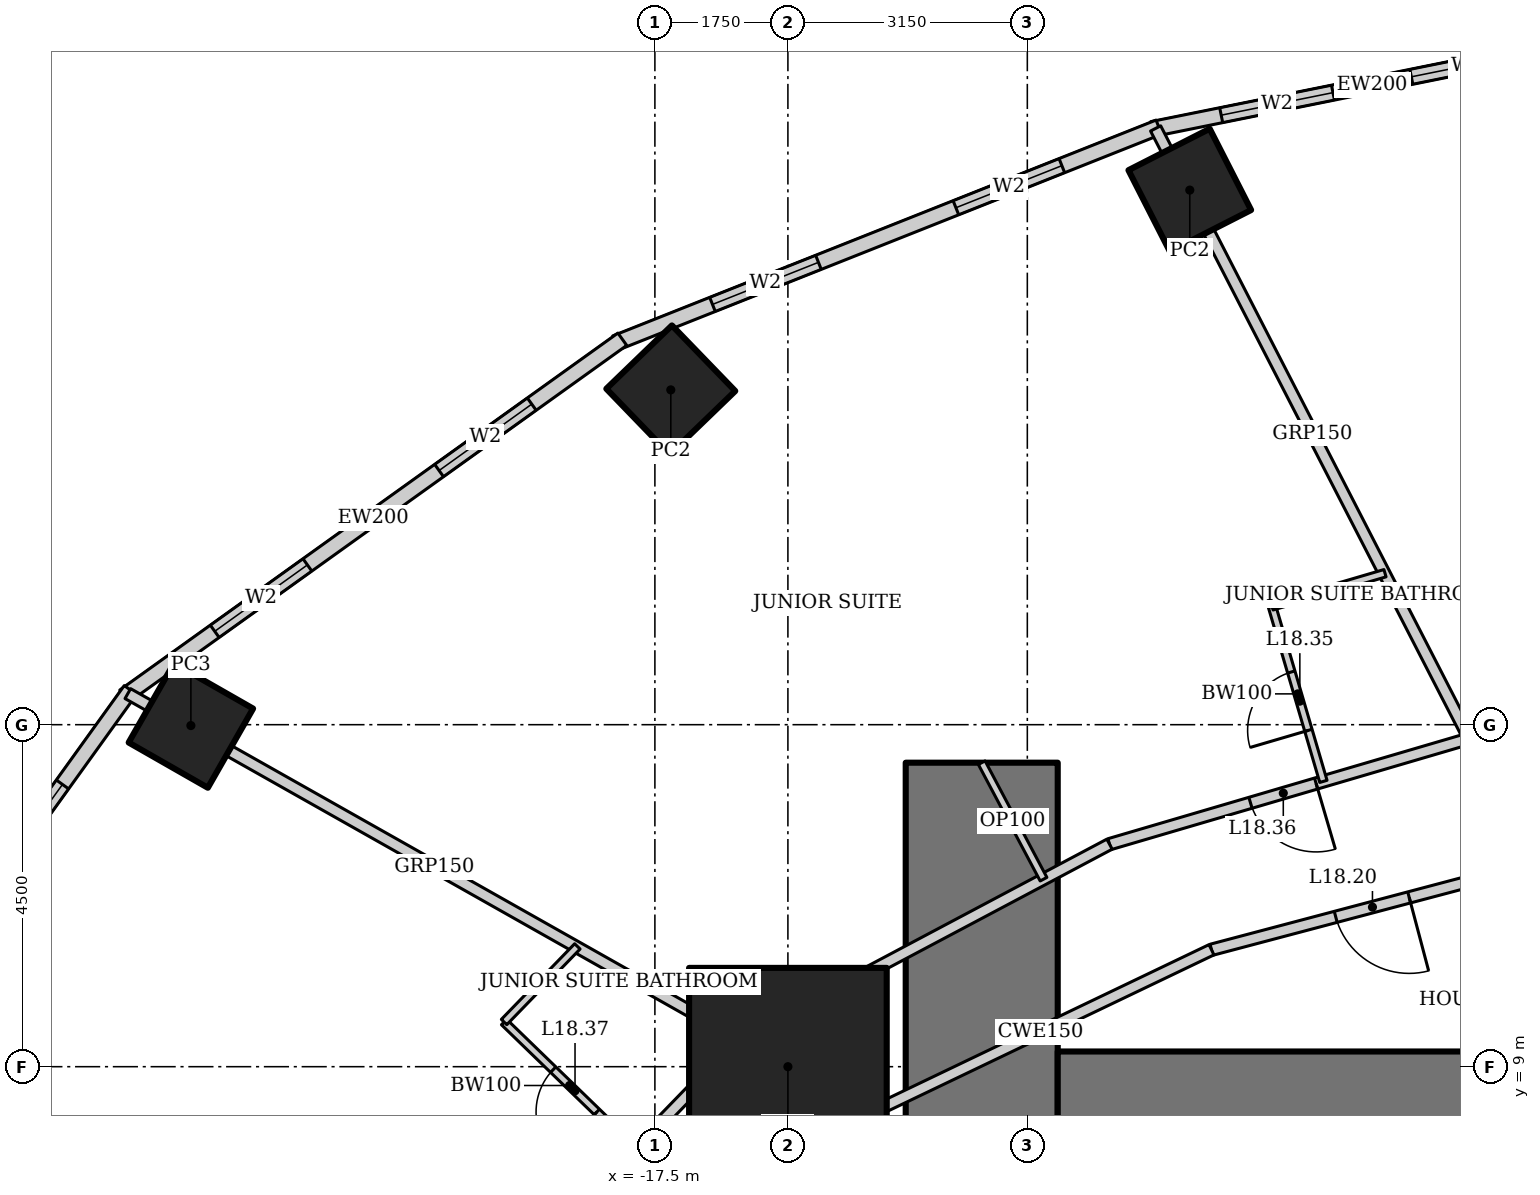
"""IFC4 building model, lengths in metres.
Left out: names, types, materials, properties, quantities, classifications, styles, units other than length and angle.
Written with IfcOpenShell. Run it as: python <this file> out.ifc"""

import sys

from ifc_helpers import new_model, si_unit, direction, frame, frame_2d, origin, origin_2d, place, context, subcontext, project, spatial, rectangle, hollow_rectangle, extrude, element, fill, save


model = new_model("IFC4")
c1 = context("Model", 3, precision=1e-05, world=origin(), true_north=direction((0.0, 1.0)))
c2 = subcontext(c1, "Body", "Model", "MODEL_VIEW")
j1 = project(units=[si_unit("LENGTHUNIT", "METRE"), si_unit("PLANEANGLEUNIT", "RADIAN")], contexts=[c1])
p1 = place(None, origin())
s1 = spatial("IfcSite", under=j1, at=p1, CompositionType="ELEMENT")
p2 = place(p1, origin())
s2 = spatial("IfcBuilding", under=s1, at=p2, CompositionType="ELEMENT")
p3 = place(p2, frame((0.0, 0.0, 80.2)))
s3 = spatial("IfcBuildingStorey", under=s2, at=p3, CompositionType="ELEMENT", Elevation=80.2)
p4 = place(p3, frame((-15.75, 9.0, 0.0), z_axis=(0.0, 0.0, 1.0), x_axis=(1.0, 0.0, 0.0)))
e1 = element("IfcColumn", 1, at=p4, inside=s3, PredefinedType="COLUMN", context=c2, shape_type="SweptSolid", body=[
    extrude(hollow_rectangle(XDim=2.6, YDim=2.6, WallThickness=0.13, at=origin_2d()), origin(), (0.0, 0.0, 1.0), 3.6),
])
for number, where, z_axis, x_axis in (
    (2, (-10.463, 20.534, 0.0), (0.0, 0.0, 1.0), (0.891, 0.454, 0.0)),
    (3, (-17.291, 17.905, 0.0), (0.0, 0.0, 1.0), (0.719, 0.695, 0.0)),
):
    element("IfcColumn", number, at=place(p3, frame(where, z_axis=z_axis, x_axis=x_axis)), inside=s3, PredefinedType="COLUMN", context=c2, shape_type="SweptSolid", body=[
        extrude(hollow_rectangle(XDim=1.2, YDim=1.2, WallThickness=0.1, at=origin_2d()), origin(), (0.0, 0.0, 1.0), 3.6),
    ])
p5 = place(p3, frame((-23.605, 13.489, 0.0), z_axis=(0.0, 0.0, 1.0), x_axis=(0.496139221777, 0.86824298017, 0.0)))
e4 = element("IfcColumn", 4, at=p5, inside=s3, PredefinedType="COLUMN", context=c2, shape_type="SweptSolid", body=[
    extrude(hollow_rectangle(XDim=1.2, YDim=1.2, WallThickness=0.12, at=origin_2d()), origin(), (0.0, 0.0, 1.0), 3.6),
])
p6 = place(p3, frame((-13.2, 13.0, 0.0), z_axis=(0.0, 0.0, 1.0), x_axis=(0.0, -1.0, 0.0)))
e5 = element("IfcWall", 5, at=p6, inside=s3, PredefinedType="SHEAR", context=c2, shape_type="SweptSolid", body=[
    extrude(rectangle(XDim=26.0, YDim=2.0, at=frame_2d((13.0, 0.0))), origin(), (0.0, 0.0, 1.0), 3.6),
])
p7 = place(p6, frame((12.1, 0.0, 0.0)))
e6 = element("IfcOpeningElement", 6, at=p7, cuts=e5, PredefinedType="OPENING", context=c2, shape_type="SweptSolid", body=[
    extrude(rectangle(XDim=1.8, YDim=2.1, at=frame_2d((0.9, 1.05))), frame((0.0, 1.01, 0.0), z_axis=(0.0, -1.0, 0.0), x_axis=(1.0, 0.0, 0.0)), (0.0, 0.0, 1.0), 2.02),
])
p8 = place(p3, frame((12.2, 8.0, 0.0), z_axis=(0.0, 0.0, 1.0), x_axis=(-1.0, 0.0, 0.0)))
e7 = element("IfcWall", 7, at=p8, inside=s3, PredefinedType="SHEAR", context=c2, shape_type="SweptSolid", body=[
    extrude(rectangle(XDim=24.4, YDim=2.4, at=frame_2d((12.2, 0.0))), origin(), (0.0, 0.0, 1.0), 3.6),
])
p9 = place(p3, frame((-5.17, 22.504, 0.0), z_axis=(0.0, 0.0, 1.0), x_axis=(-0.980251657452, -0.197754110105, 0.0)))
e8 = element("IfcWall", 8, at=p9, inside=s3, PredefinedType="SOLIDWALL", context=c2, shape_type="SweptSolid", body=[
    extrude(rectangle(XDim=5.904, YDim=0.2, at=frame_2d((2.952, 0.0))), origin(), (0.0, 0.0, 1.0), 3.45),
])
p10 = place(p9, frame((0.926, 0.0, 0.5)))
e9 = element("IfcOpeningElement", 9, at=p10, cuts=e8, PredefinedType="OPENING", context=c2, shape_type="SweptSolid", body=[
    extrude(rectangle(XDim=1.5, YDim=2.2, at=frame_2d((0.75, 1.1))), frame((0.0, 0.11, 0.0), z_axis=(0.0, -1.0, 0.0), x_axis=(1.0, 0.0, 0.0)), (0.0, 0.0, 1.0), 0.22),
])
p11 = place(p9, frame((3.478, 0.0, 0.5)))
e10 = element("IfcOpeningElement", 10, at=p11, cuts=e8, PredefinedType="OPENING", context=c2, shape_type="SweptSolid", body=[
    extrude(rectangle(XDim=1.5, YDim=2.2, at=frame_2d((0.75, 1.1))), frame((0.0, 0.11, 0.0), z_axis=(0.0, -1.0, 0.0), x_axis=(1.0, 0.0, 0.0)), (0.0, 0.0, 1.0), 0.22),
])
p12 = place(p3, frame((-10.869, 21.363, 0.0), z_axis=(0.0, 0.0, 1.0), x_axis=(-0.929358351251, -0.369178892895, 0.0)))
e11 = element("IfcWall", 11, at=p12, inside=s3, PredefinedType="SOLIDWALL", context=c2, shape_type="SweptSolid", body=[
    extrude(rectangle(XDim=7.692, YDim=0.2, at=frame_2d((3.846, 0.0))), origin(), (0.0, 0.0, 1.0), 3.45),
])
p13 = place(p12, frame((1.373, 0.0, 0.5)))
e12 = element("IfcOpeningElement", 12, at=p13, cuts=e11, PredefinedType="OPENING", context=c2, shape_type="SweptSolid", body=[
    extrude(rectangle(XDim=1.5, YDim=2.2, at=frame_2d((0.75, 1.1))), frame((0.0, 0.11, 0.0), z_axis=(0.0, -1.0, 0.0), x_axis=(1.0, 0.0, 0.0)), (0.0, 0.0, 1.0), 0.22),
])
p14 = place(p12, frame((4.819, 0.0, 0.5)))
e13 = element("IfcOpeningElement", 13, at=p14, cuts=e11, PredefinedType="OPENING", context=c2, shape_type="SweptSolid", body=[
    extrude(rectangle(XDim=1.5, YDim=2.2, at=frame_2d((0.75, 1.1))), frame((0.0, 0.11, 0.0), z_axis=(0.0, -1.0, 0.0), x_axis=(1.0, 0.0, 0.0)), (0.0, 0.0, 1.0), 0.22),
])
p15 = place(p3, frame((-17.929, 18.572, 0.0), z_axis=(0.0, 0.0, 1.0), x_axis=(-0.812791321576, -0.582554948112, 0.0)))
e14 = element("IfcWall", 14, at=p15, inside=s3, PredefinedType="SOLIDWALL", context=c2, shape_type="SweptSolid", body=[
    extrude(rectangle(XDim=8.063, YDim=0.2, at=frame_2d((4.032, 0.0))), origin(), (0.0, 0.0, 1.0), 3.45),
])
p16 = place(p15, frame((1.466, 0.0, 0.5)))
e15 = element("IfcOpeningElement", 15, at=p16, cuts=e14, PredefinedType="OPENING", context=c2, shape_type="SweptSolid", body=[
    extrude(rectangle(XDim=1.5, YDim=2.2, at=frame_2d((0.75, 1.1))), frame((0.0, 0.11, 0.0), z_axis=(0.0, -1.0, 0.0), x_axis=(1.0, 0.0, 0.0)), (0.0, 0.0, 1.0), 0.22),
])
p17 = place(p15, frame((5.097, 0.0, 0.5)))
e16 = element("IfcOpeningElement", 16, at=p17, cuts=e14, PredefinedType="OPENING", context=c2, shape_type="SweptSolid", body=[
    extrude(rectangle(XDim=1.5, YDim=2.2, at=frame_2d((0.75, 1.1))), frame((0.0, 0.11, 0.0), z_axis=(0.0, -1.0, 0.0), x_axis=(1.0, 0.0, 0.0)), (0.0, 0.0, 1.0), 0.22),
])
p18 = place(p3, frame((-24.4, 13.957, 0.0), z_axis=(0.0, 0.0, 1.0), x_axis=(-0.583937613703, -0.811798536155, 0.0)))
e17 = element("IfcWall", 17, at=p18, inside=s3, PredefinedType="SOLIDWALL", context=c2, shape_type="SweptSolid", body=[
    extrude(rectangle(XDim=8.323, YDim=0.2, at=frame_2d((4.162, 0.0))), origin(), (0.0, 0.0, 1.0), 3.45),
])
p19 = place(p18, frame((1.531, 0.0, 0.5)))
e18 = element("IfcOpeningElement", 18, at=p19, cuts=e17, PredefinedType="OPENING", context=c2, shape_type="SweptSolid", body=[
    extrude(rectangle(XDim=1.5, YDim=2.2, at=frame_2d((0.75, 1.1))), frame((0.0, 0.11, 0.0), z_axis=(0.0, -1.0, 0.0), x_axis=(1.0, 0.0, 0.0)), (0.0, 0.0, 1.0), 0.22),
])
p20 = place(p18, frame((5.292, 0.0, 0.5)))
e19 = element("IfcOpeningElement", 19, at=p20, cuts=e17, PredefinedType="OPENING", context=c2, shape_type="SweptSolid", body=[
    extrude(rectangle(XDim=1.5, YDim=2.2, at=frame_2d((0.75, 1.1))), frame((0.0, 0.11, 0.0), z_axis=(0.0, -1.0, 0.0), x_axis=(1.0, 0.0, 0.0)), (0.0, 0.0, 1.0), 0.22),
])
p21 = place(p3, frame((-10.912, 21.346, 0.0), z_axis=(0.0, 0.0, 1.0), x_axis=(0.457117602022, -0.889406261458, 0.0)))
e20 = element("IfcWall", 20, at=p21, inside=s3, PredefinedType="PARTITIONING", context=c2, shape_type="SweptSolid", body=[
    extrude(rectangle(XDim=9.027, YDim=0.15, at=frame_2d((4.513, 0.0))), origin(), (0.0, 0.0, 1.0), 2.528),
])
p22 = place(p3, frame((-24.435, 13.909, 0.0), z_axis=(0.0, 0.0, 1.0), x_axis=(0.870744406136, -0.491735883563, 0.0)))
e21 = element("IfcWall", 21, at=p22, inside=s3, PredefinedType="PARTITIONING", context=c2, shape_type="SweptSolid", body=[
    extrude(rectangle(XDim=9.263, YDim=0.15, at=frame_2d((4.631, 0.0))), origin(), (0.0, 0.0, 1.0), 2.693),
])
p23 = place(p3, frame((-6.786, 13.317, 0.0), z_axis=(0.0, 0.0, 1.0), x_axis=(-0.959496227294, -0.281721475589, 0.0)))
e22 = element("IfcWall", 22, at=p23, inside=s3, PredefinedType="PARTITIONING", context=c2, shape_type="SweptSolid", body=[
    extrude(rectangle(XDim=4.933, YDim=0.15, at=frame_2d((2.466, 0.0))), origin(), (0.0, 0.0, 1.0), 3.45),
])
p24 = place(p23, frame((2.1, 0.0, 0.0)))
e23 = element("IfcOpeningElement", 23, at=p24, cuts=e22, PredefinedType="OPENING", context=c2, shape_type="SweptSolid", body=[
    extrude(rectangle(XDim=0.9, YDim=2.1, at=frame_2d((0.45, 1.05))), frame((0.0, 0.085, 0.0), z_axis=(0.0, -1.0, 0.0), x_axis=(1.0, 0.0, 0.0)), (0.0, 0.0, 1.0), 0.17),
])
p25 = place(p3, frame((-11.519, 11.928, 0.0), z_axis=(0.0, 0.0, 1.0), x_axis=(-0.883334368785, -0.468743419071, 0.0)))
e24 = element("IfcWall", 24, at=p25, inside=s3, PredefinedType="PARTITIONING", context=c2, shape_type="SweptSolid", body=[
    extrude(rectangle(XDim=5.491, YDim=0.15, at=frame_2d((2.746, 0.0))), origin(), (0.0, 0.0, 1.0), 3.45),
])
p26 = place(p3, frame((-16.369, 9.354, 0.0), z_axis=(0.0, 0.0, 1.0), x_axis=(-0.695871090686, -0.71816671125, 0.0)))
e25 = element("IfcWall", 25, at=p26, inside=s3, PredefinedType="PARTITIONING", context=c2, shape_type="SweptSolid", body=[
    extrude(rectangle(XDim=5.913, YDim=0.15, at=frame_2d((2.957, 0.0))), origin(), (0.0, 0.0, 1.0), 3.45),
])
p27 = place(p3, frame((-5.941, 11.66, 0.0), z_axis=(0.0, 0.0, 1.0), x_axis=(-0.966672790407, -0.256015070428, 0.0)))
e26 = element("IfcWall", 26, at=p27, inside=s3, PredefinedType="PARTITIONING", context=c2, shape_type="SweptSolid", body=[
    extrude(rectangle(XDim=4.382, YDim=0.15, at=frame_2d((2.191, 0.0))), origin(), (0.0, 0.0, 1.0), 3.45),
])
p28 = place(p27, frame((1.691, 0.0, 0.0)))
e27 = element("IfcOpeningElement", 27, at=p28, cuts=e26, PredefinedType="OPENING", context=c2, shape_type="SweptSolid", body=[
    extrude(rectangle(XDim=1.0, YDim=2.1, at=frame_2d((0.5, 1.05))), frame((0.0, 0.085, 0.0), z_axis=(0.0, -1.0, 0.0), x_axis=(1.0, 0.0, 0.0)), (0.0, 0.0, 1.0), 0.17),
])
p29 = place(p3, frame((-10.177, 10.539, 0.0), z_axis=(0.0, 0.0, 1.0), x_axis=(-0.901869692799, -0.43200816799, 0.0)))
e28 = element("IfcWall", 28, at=p29, inside=s3, PredefinedType="PARTITIONING", context=c2, shape_type="SweptSolid", body=[
    extrude(rectangle(XDim=4.986, YDim=0.15, at=frame_2d((2.493, 0.0))), origin(), (0.0, 0.0, 1.0), 3.45),
])
p30 = place(p3, frame((-14.673, 8.385, 0.0), z_axis=(0.0, 0.0, 1.0), x_axis=(-0.731260145007, -0.682098673452, 0.0)))
e29 = element("IfcWall", 29, at=p30, inside=s3, PredefinedType="PARTITIONING", context=c2, shape_type="SweptSolid", body=[
    extrude(rectangle(XDim=5.468, YDim=0.15, at=frame_2d((2.734, 0.0))), origin(), (0.0, 0.0, 1.0), 3.45),
])
p31 = place(p30, frame((2.234, 0.0, 0.0)))
e30 = element("IfcOpeningElement", 30, at=p31, cuts=e29, PredefinedType="OPENING", context=c2, shape_type="SweptSolid", body=[
    extrude(rectangle(XDim=1.0, YDim=2.1, at=frame_2d((0.5, 1.05))), frame((0.0, 0.085, 0.0), z_axis=(0.0, -1.0, 0.0), x_axis=(1.0, 0.0, 0.0)), (0.0, 0.0, 1.0), 0.17),
])
p32 = place(p3, frame((-8.705, 12.754, 0.0), z_axis=(0.0, 0.0, 1.0), x_axis=(-0.281659633817, 0.959514382736, 0.0)))
e31 = element("IfcWall", 31, at=p32, inside=s3, PredefinedType="PARTITIONING", context=c2, shape_type="SweptSolid", body=[
    extrude(rectangle(XDim=2.4, YDim=0.1, at=frame_2d((1.2, 0.0))), origin(), (0.0, 0.0, 1.0), 3.45),
])
p33 = place(p32, frame((0.7, 0.0, 0.0)))
e32 = element("IfcOpeningElement", 32, at=p33, cuts=e31, PredefinedType="OPENING", context=c2, shape_type="SweptSolid", body=[
    extrude(rectangle(XDim=0.8, YDim=2.1, at=frame_2d((0.4, 1.05))), frame((0.0, 0.06, 0.0), z_axis=(0.0, -1.0, 0.0), x_axis=(1.0, 0.0, 0.0)), (0.0, 0.0, 1.0), 0.12),
])
p34 = place(p3, frame((-9.381, 15.057, 0.0), z_axis=(0.0, 0.0, 1.0), x_axis=(0.959518451093, 0.281645773999, 0.0)))
e33 = element("IfcWall", 33, at=p34, inside=s3, PredefinedType="PARTITIONING", context=c2, shape_type="SweptSolid", body=[
    extrude(rectangle(XDim=1.549, YDim=0.1, at=frame_2d((0.774, 0.0))), origin(), (0.0, 0.0, 1.0), 3.45),
])
p35 = place(p3, frame((-17.761, 7.917, 0.0), z_axis=(0.0, 0.0, 1.0), x_axis=(-0.718157610206, 0.695880483204, 0.0)))
e34 = element("IfcWall", 34, at=p35, inside=s3, PredefinedType="PARTITIONING", context=c2, shape_type="SweptSolid", body=[
    extrude(rectangle(XDim=2.4, YDim=0.1, at=frame_2d((1.2, 0.0))), origin(), (0.0, 0.0, 1.0), 3.45),
])
p36 = place(p35, frame((0.7, 0.0, 0.0)))
e35 = element("IfcOpeningElement", 35, at=p36, cuts=e34, PredefinedType="OPENING", context=c2, shape_type="SweptSolid", body=[
    extrude(rectangle(XDim=0.8, YDim=2.1, at=frame_2d((0.4, 1.05))), frame((0.0, 0.06, 0.0), z_axis=(0.0, -1.0, 0.0), x_axis=(1.0, 0.0, 0.0)), (0.0, 0.0, 1.0), 0.12),
])
p37 = place(p3, frame((-19.484, 9.588, 0.0), z_axis=(0.0, 0.0, 1.0), x_axis=(0.695920174922, 0.718119147591, 0.0)))
e36 = element("IfcWall", 36, at=p37, inside=s3, PredefinedType="PARTITIONING", context=c2, shape_type="SweptSolid", body=[
    extrude(rectangle(XDim=1.386, YDim=0.1, at=frame_2d((0.693, 0.0))), origin(), (0.0, 0.0, 1.0), 3.45),
])
p38 = place(p3, frame((-13.2, 13.0, 0.0), z_axis=(0.0, 0.0, 1.0), x_axis=(0.46874717052, -0.88333237806, 0.0)))
e37 = element("IfcWall", 37, at=p38, inside=s3, PredefinedType="PARTITIONING", context=c2, shape_type="SweptSolid", body=[
    extrude(rectangle(XDim=1.735, YDim=0.1, at=frame_2d((0.868, 0.0))), origin(), (0.0, 0.0, 1.0), 3.45),
])
p39 = place(p10, origin())
e38 = element("IfcWindow", 38, at=p39, inside=s3, PartitioningType="SINGLE_PANEL", PredefinedType="WINDOW", context=c2, shape_type="SweptSolid", body=[
    extrude(rectangle(XDim=1.5, YDim=2.2, at=frame_2d((0.75, 1.1))), frame((0.0, 0.03, 0.0), z_axis=(0.0, -1.0, 0.0), x_axis=(1.0, 0.0, 0.0)), (0.0, 0.0, 1.0), 0.06),
])
fill(e9, e38)
p40 = place(p11, origin())
e39 = element("IfcWindow", 39, at=p40, inside=s3, PartitioningType="SINGLE_PANEL", PredefinedType="WINDOW", context=c2, shape_type="SweptSolid", body=[
    extrude(rectangle(XDim=1.5, YDim=2.2, at=frame_2d((0.75, 1.1))), frame((0.0, 0.03, 0.0), z_axis=(0.0, -1.0, 0.0), x_axis=(1.0, 0.0, 0.0)), (0.0, 0.0, 1.0), 0.06),
])
fill(e10, e39)
p41 = place(p13, origin())
e40 = element("IfcWindow", 40, at=p41, inside=s3, PartitioningType="SINGLE_PANEL", PredefinedType="WINDOW", context=c2, shape_type="SweptSolid", body=[
    extrude(rectangle(XDim=1.5, YDim=2.2, at=frame_2d((0.75, 1.1))), frame((0.0, 0.03, 0.0), z_axis=(0.0, -1.0, 0.0), x_axis=(1.0, 0.0, 0.0)), (0.0, 0.0, 1.0), 0.06),
])
fill(e12, e40)
p42 = place(p14, origin())
e41 = element("IfcWindow", 41, at=p42, inside=s3, PartitioningType="SINGLE_PANEL", PredefinedType="WINDOW", context=c2, shape_type="SweptSolid", body=[
    extrude(rectangle(XDim=1.5, YDim=2.2, at=frame_2d((0.75, 1.1))), frame((0.0, 0.03, 0.0), z_axis=(0.0, -1.0, 0.0), x_axis=(1.0, 0.0, 0.0)), (0.0, 0.0, 1.0), 0.06),
])
fill(e13, e41)
p43 = place(p16, origin())
e42 = element("IfcWindow", 42, at=p43, inside=s3, PartitioningType="SINGLE_PANEL", PredefinedType="WINDOW", context=c2, shape_type="SweptSolid", body=[
    extrude(rectangle(XDim=1.5, YDim=2.2, at=frame_2d((0.75, 1.1))), frame((0.0, 0.03, 0.0), z_axis=(0.0, -1.0, 0.0), x_axis=(1.0, 0.0, 0.0)), (0.0, 0.0, 1.0), 0.06),
])
fill(e15, e42)
p44 = place(p17, origin())
e43 = element("IfcWindow", 43, at=p44, inside=s3, PartitioningType="SINGLE_PANEL", PredefinedType="WINDOW", context=c2, shape_type="SweptSolid", body=[
    extrude(rectangle(XDim=1.5, YDim=2.2, at=frame_2d((0.75, 1.1))), frame((0.0, 0.03, 0.0), z_axis=(0.0, -1.0, 0.0), x_axis=(1.0, 0.0, 0.0)), (0.0, 0.0, 1.0), 0.06),
])
fill(e16, e43)
p45 = place(p19, origin())
e44 = element("IfcWindow", 44, at=p45, inside=s3, PartitioningType="SINGLE_PANEL", PredefinedType="WINDOW", context=c2, shape_type="SweptSolid", body=[
    extrude(rectangle(XDim=1.5, YDim=2.2, at=frame_2d((0.75, 1.1))), frame((0.0, 0.03, 0.0), z_axis=(0.0, -1.0, 0.0), x_axis=(1.0, 0.0, 0.0)), (0.0, 0.0, 1.0), 0.06),
])
fill(e18, e44)
p46 = place(p28, origin())
e45 = element("IfcDoor", 45, at=p46, inside=s3, OperationType="SINGLE_SWING_LEFT", PredefinedType="DOOR", context=c2, shape_type="SweptSolid", body=[
    extrude(rectangle(XDim=1.0, YDim=2.1, at=frame_2d((0.5, 1.05))), frame((0.0, 0.025, 0.0), z_axis=(0.0, -1.0, 0.0), x_axis=(1.0, 0.0, 0.0)), (0.0, 0.0, 1.0), 0.05),
])
fill(e27, e45)
p47 = place(p33, origin())
e46 = element("IfcDoor", 46, at=p47, inside=s3, OperationType="SINGLE_SWING_LEFT", PredefinedType="DOOR", context=c2, shape_type="SweptSolid", body=[
    extrude(rectangle(XDim=0.8, YDim=2.1, at=frame_2d((0.4, 1.05))), frame((0.0, 0.025, 0.0), z_axis=(0.0, -1.0, 0.0), x_axis=(1.0, 0.0, 0.0)), (0.0, 0.0, 1.0), 0.05),
])
fill(e32, e46)
p48 = place(p24, origin())
e47 = element("IfcDoor", 47, at=p48, inside=s3, OperationType="SINGLE_SWING_LEFT", PredefinedType="DOOR", context=c2, shape_type="SweptSolid", body=[
    extrude(rectangle(XDim=0.9, YDim=2.1, at=frame_2d((0.45, 1.05))), frame((0.0, 0.025, 0.0), z_axis=(0.0, -1.0, 0.0), x_axis=(1.0, 0.0, 0.0)), (0.0, 0.0, 1.0), 0.05),
])
fill(e23, e47)
p49 = place(p36, origin())
e48 = element("IfcDoor", 48, at=p49, inside=s3, OperationType="SINGLE_SWING_LEFT", PredefinedType="DOOR", context=c2, shape_type="SweptSolid", body=[
    extrude(rectangle(XDim=0.8, YDim=2.1, at=frame_2d((0.4, 1.05))), frame((0.0, 0.025, 0.0), z_axis=(0.0, -1.0, 0.0), x_axis=(1.0, 0.0, 0.0)), (0.0, 0.0, 1.0), 0.05),
])
fill(e35, e48)
save(model, sys.argv[1])
